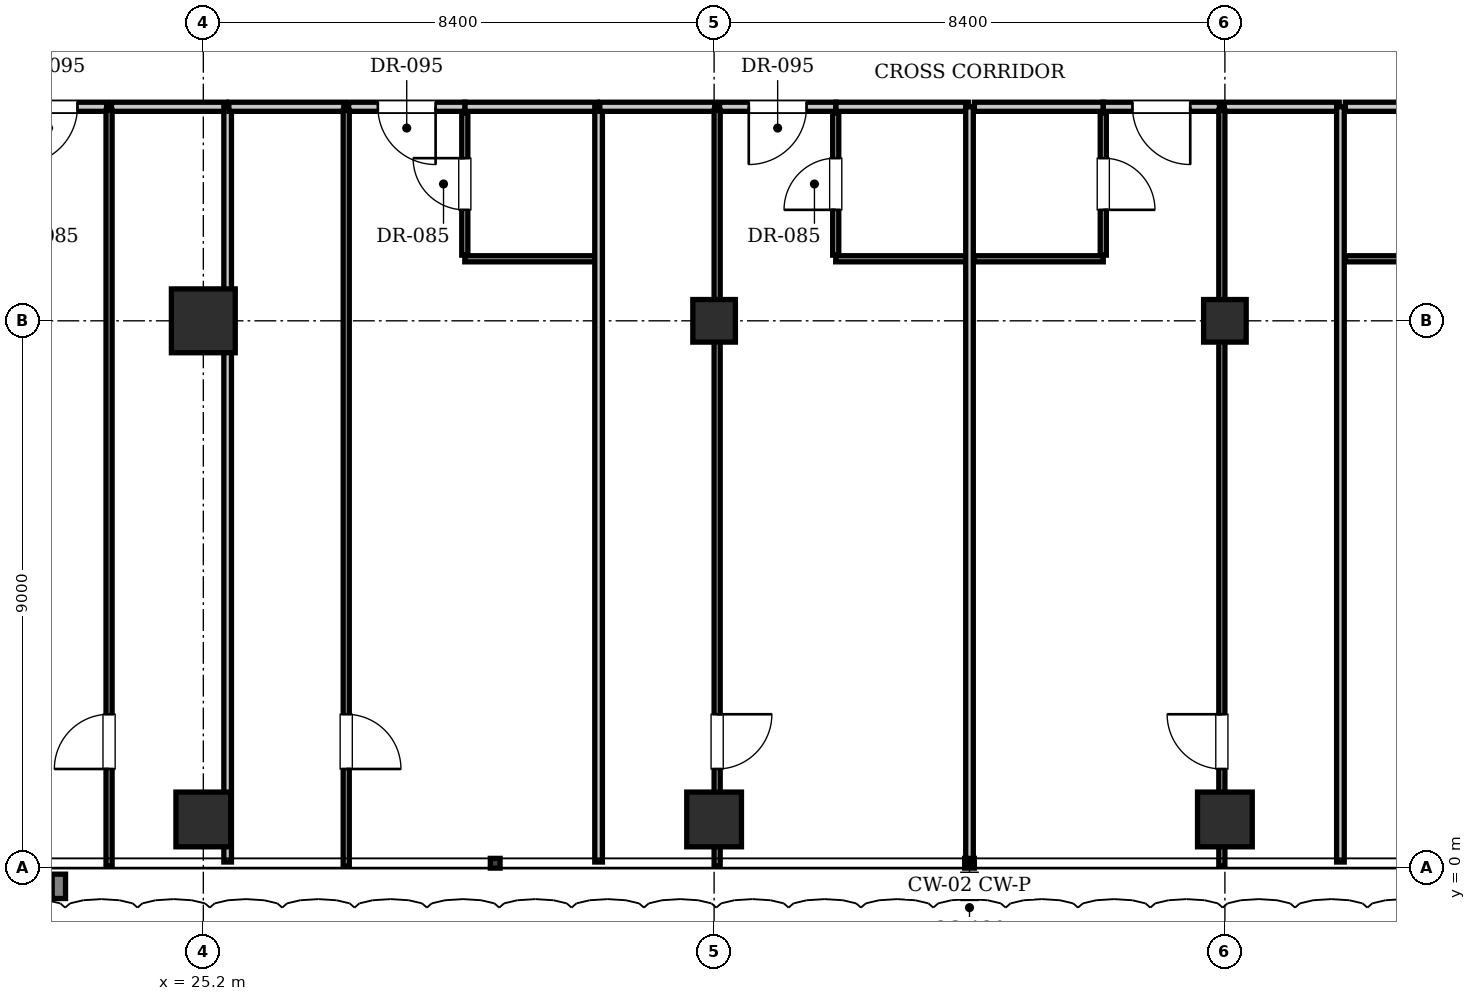
"""IFC4 building model, lengths in metres.
Left out: names, types, materials, properties, quantities, classifications, styles, units other than length and angle.
Written with IfcOpenShell. Run it as: python <this file> out.ifc"""

import sys

from ifc_helpers import new_model, si_unit, direction, frame, frame_2d, origin, origin_2d, place, context, subcontext, project, spatial, rectangle, i_section, extrude, element, fill, save


model = new_model("IFC4")
c1 = context("Model", 3, precision=1e-05, world=origin(), true_north=direction((0.0, 1.0)))
c2 = subcontext(c1, "Body", "Model", "MODEL_VIEW")
j1 = project(units=[si_unit("LENGTHUNIT", "METRE"), si_unit("PLANEANGLEUNIT", "RADIAN")], contexts=[c1])
p1 = place(None, origin())
s1 = spatial("IfcSite", under=j1, at=p1, CompositionType="ELEMENT")
p2 = place(p1, origin())
s2 = spatial("IfcBuilding", under=s1, at=p2, CompositionType="ELEMENT")
p3 = place(p2, frame((0.0, 0.0, 34.65)))
s3 = spatial("IfcBuildingStorey", under=s2, at=p3, CompositionType="ELEMENT", Elevation=34.65)
p4 = place(p3, frame((25.2, 9.0, 0.0), z_axis=(0.0, 0.0, 1.0), x_axis=(1.0, 0.0, 0.0)))
e1 = element("IfcColumn", 1, at=p4, inside=s3, PredefinedType="COLUMN", context=c2, shape_type="SweptSolid", body=[
    extrude(rectangle(XDim=1.05, YDim=1.05, at=origin_2d()), origin(), (0.0, 0.0, 1.0), 3.85),
])
for number, where, z_axis, x_axis in (
    (2, (33.6, 9.0, 0.0), (0.0, 0.0, 1.0), (1.0, 0.0, 0.0)),
    (3, (42.0, 9.0, 0.0), (0.0, 0.0, 1.0), (1.0, 0.0, 0.0)),
):
    element("IfcColumn", number, at=place(p3, frame(where, z_axis=z_axis, x_axis=x_axis)), inside=s3, PredefinedType="COLUMN", context=c2, shape_type="SweptSolid", body=[
        extrude(i_section(OverallWidth=0.7, OverallDepth=0.7, WebThickness=0.028, FlangeThickness=0.044, at=origin_2d()), origin(), (0.0, 0.0, 1.0), 3.85),
    ])
for number, where, z_axis, x_axis in (
    (4, (25.2, 0.8, 0.0), (0.0, 0.0, 1.0), (1.0, 0.0, 0.0)),
    (5, (33.6, 0.8, 0.0), (0.0, 0.0, 1.0), (1.0, 0.0, 0.0)),
    (6, (42.0, 0.8, 0.0), (0.0, 0.0, 1.0), (1.0, 0.0, 0.0)),
):
    element("IfcColumn", number, at=place(p3, frame(where, z_axis=z_axis, x_axis=x_axis)), inside=s3, PredefinedType="COLUMN", context=c2, shape_type="SweptSolid", body=[
        extrude(rectangle(XDim=0.9, YDim=0.9, at=origin_2d()), origin(), (0.0, 0.0, 1.0), 3.85),
    ])
p5 = place(p3, frame((21.7, 12.52, 0.0), z_axis=(0.0, 0.0, 1.0), x_axis=(1.0, 0.0, 0.0)))
e7 = element("IfcWall", 7, at=p5, inside=s3, PredefinedType="PARTITIONING", context=c2, shape_type="SweptSolid", body=[
    extrude(rectangle(XDim=1.91, YDim=0.15, at=frame_2d((0.955, 0.0))), origin(), (0.0, 0.0, 1.0), 3.61),
])
p6 = place(p5, frame((0.48, 0.0, 0.0)))
e8 = element("IfcOpeningElement", 8, at=p6, cuts=e7, PredefinedType="OPENING", context=c2, shape_type="SweptSolid", body=[
    extrude(rectangle(XDim=0.95, YDim=2.15, at=frame_2d((0.475, 1.075))), frame((0.0, 0.085, 0.0), z_axis=(0.0, -1.0, 0.0), x_axis=(1.0, 0.0, 0.0)), (0.0, 0.0, 1.0), 0.17),
])
p7 = place(p3, frame((23.69, 12.52, 0.0), z_axis=(0.0, 0.0, 1.0), x_axis=(1.0, 0.0, 0.0)))
e9 = element("IfcWall", 9, at=p7, inside=s3, PredefinedType="PARTITIONING", context=c2, shape_type="SweptSolid", body=[
    extrude(rectangle(XDim=1.89, YDim=0.15, at=frame_2d((0.945, 0.0))), origin(), (0.0, 0.0, 1.0), 3.61),
])
p8 = place(p3, frame((23.65, 0.03, 0.0), z_axis=(0.0, 0.0, 1.0), x_axis=(0.0, 1.0, 0.0)))
e10 = element("IfcWall", 10, at=p8, inside=s3, PredefinedType="PARTITIONING", context=c2, shape_type="SweptSolid", body=[
    extrude(rectangle(XDim=12.43, YDim=0.1, at=frame_2d((6.215, 0.0))), origin(), (0.0, 0.0, 1.0), 3.61),
])
p9 = place(p8, frame((1.6, 0.0, 0.0)))
e11 = element("IfcOpeningElement", 11, at=p9, cuts=e10, PredefinedType="OPENING", context=c2, shape_type="SweptSolid", body=[
    extrude(rectangle(XDim=0.9, YDim=2.1, at=frame_2d((0.45, 1.05))), frame((0.0, 0.06, 0.0), z_axis=(0.0, -1.0, 0.0), x_axis=(1.0, 0.0, 0.0)), (0.0, 0.0, 1.0), 0.12),
])
p10 = place(p3, frame((25.6, 0.1, 0.0), z_axis=(0.0, 0.0, 1.0), x_axis=(0.0, 1.0, 0.0)))
e12 = element("IfcWall", 12, at=p10, inside=s3, PredefinedType="PARTITIONING", context=c2, shape_type="SweptSolid", body=[
    extrude(rectangle(XDim=12.42, YDim=0.125, at=frame_2d((6.21, 0.0))), origin(), (0.0, 0.0, 1.0), 3.61),
])
p11 = place(p3, frame((29.5, 12.52, 0.0), z_axis=(0.0, 0.0, 1.0), x_axis=(1.0, 0.0, 0.0)))
e13 = element("IfcWall", 13, at=p11, inside=s3, PredefinedType="PARTITIONING", context=c2, shape_type="SweptSolid", body=[
    extrude(rectangle(XDim=2.18, YDim=0.15, at=frame_2d((1.09, 0.0))), origin(), (0.0, 0.0, 1.0), 3.61),
])
p12 = place(p3, frame((29.5, 10.02, 0.0), z_axis=(0.0, 0.0, 1.0), x_axis=(1.0, 0.0, 0.0)))
e14 = element("IfcWall", 14, at=p12, inside=s3, PredefinedType="PARTITIONING", context=c2, shape_type="SweptSolid", body=[
    extrude(rectangle(XDim=2.16, YDim=0.1, at=frame_2d((1.08, 0.0))), origin(), (0.0, 0.0, 1.0), 3.61),
])
p13 = place(p3, frame((29.5, 10.08, 0.0), z_axis=(0.0, 0.0, 1.0), x_axis=(0.0, 1.0, 0.0)))
e15 = element("IfcWall", 15, at=p13, inside=s3, PredefinedType="PARTITIONING", context=c2, shape_type="SweptSolid", body=[
    extrude(rectangle(XDim=2.34, YDim=0.1, at=frame_2d((1.17, 0.0))), origin(), (0.0, 0.0, 1.0), 3.61),
])
p14 = place(p13, frame((0.745, 0.0, 0.0)))
e16 = element("IfcOpeningElement", 16, at=p14, cuts=e15, PredefinedType="OPENING", context=c2, shape_type="SweptSolid", body=[
    extrude(rectangle(XDim=0.85, YDim=2.1, at=frame_2d((0.425, 1.05))), frame((0.0, 0.06, 0.0), z_axis=(0.0, -1.0, 0.0), x_axis=(1.0, 0.0, 0.0)), (0.0, 0.0, 1.0), 0.12),
])
p15 = place(p3, frame((25.62, 12.52, 0.0), z_axis=(0.0, 0.0, 1.0), x_axis=(1.0, 0.0, 0.0)))
e17 = element("IfcWall", 17, at=p15, inside=s3, PredefinedType="PARTITIONING", context=c2, shape_type="SweptSolid", body=[
    extrude(rectangle(XDim=1.89, YDim=0.15, at=frame_2d((0.945, 0.0))), origin(), (0.0, 0.0, 1.0), 3.61),
])
p16 = place(p3, frame((27.59, 12.52, 0.0), z_axis=(0.0, 0.0, 1.0), x_axis=(1.0, 0.0, 0.0)))
e18 = element("IfcWall", 18, at=p16, inside=s3, PredefinedType="PARTITIONING", context=c2, shape_type="SweptSolid", body=[
    extrude(rectangle(XDim=1.91, YDim=0.15, at=frame_2d((0.955, 0.0))), origin(), (0.0, 0.0, 1.0), 3.61),
])
p17 = place(p16, frame((0.48, 0.0, 0.0)))
e19 = element("IfcOpeningElement", 19, at=p17, cuts=e18, PredefinedType="OPENING", context=c2, shape_type="SweptSolid", body=[
    extrude(rectangle(XDim=0.95, YDim=2.15, at=frame_2d((0.475, 1.075))), frame((0.0, 0.085, 0.0), z_axis=(0.0, -1.0, 0.0), x_axis=(1.0, 0.0, 0.0)), (0.0, 0.0, 1.0), 0.17),
])
p18 = place(p3, frame((27.55, 0.03, 0.0), z_axis=(0.0, 0.0, 1.0), x_axis=(0.0, 1.0, 0.0)))
e20 = element("IfcWall", 20, at=p18, inside=s3, PredefinedType="PARTITIONING", context=c2, shape_type="SweptSolid", body=[
    extrude(rectangle(XDim=12.43, YDim=0.1, at=frame_2d((6.215, 0.0))), origin(), (0.0, 0.0, 1.0), 3.61),
])
p19 = place(p18, frame((1.6, 0.0, 0.0)))
e21 = element("IfcOpeningElement", 21, at=p19, cuts=e20, PredefinedType="OPENING", context=c2, shape_type="SweptSolid", body=[
    extrude(rectangle(XDim=0.9, YDim=2.1, at=frame_2d((0.45, 1.05))), frame((0.0, 0.06, 0.0), z_axis=(0.0, -1.0, 0.0), x_axis=(1.0, 0.0, 0.0)), (0.0, 0.0, 1.0), 0.12),
])
p20 = place(p3, frame((31.7, 0.1, 0.0), z_axis=(0.0, 0.0, 1.0), x_axis=(0.0, 1.0, 0.0)))
e22 = element("IfcWall", 22, at=p20, inside=s3, PredefinedType="PARTITIONING", context=c2, shape_type="SweptSolid", body=[
    extrude(rectangle(XDim=12.42, YDim=0.125, at=frame_2d((6.21, 0.0))), origin(), (0.0, 0.0, 1.0), 3.61),
])
p21 = place(p3, frame((35.6, 12.52, 0.0), z_axis=(0.0, 0.0, 1.0), x_axis=(1.0, 0.0, 0.0)))
e23 = element("IfcWall", 23, at=p21, inside=s3, PredefinedType="PARTITIONING", context=c2, shape_type="SweptSolid", body=[
    extrude(rectangle(XDim=2.18, YDim=0.15, at=frame_2d((1.09, 0.0))), origin(), (0.0, 0.0, 1.0), 3.61),
])
p22 = place(p3, frame((35.6, 10.02, 0.0), z_axis=(0.0, 0.0, 1.0), x_axis=(1.0, 0.0, 0.0)))
e24 = element("IfcWall", 24, at=p22, inside=s3, PredefinedType="PARTITIONING", context=c2, shape_type="SweptSolid", body=[
    extrude(rectangle(XDim=2.16, YDim=0.1, at=frame_2d((1.08, 0.0))), origin(), (0.0, 0.0, 1.0), 3.61),
])
p23 = place(p3, frame((35.6, 10.08, 0.0), z_axis=(0.0, 0.0, 1.0), x_axis=(0.0, 1.0, 0.0)))
e25 = element("IfcWall", 25, at=p23, inside=s3, PredefinedType="PARTITIONING", context=c2, shape_type="SweptSolid", body=[
    extrude(rectangle(XDim=2.34, YDim=0.1, at=frame_2d((1.17, 0.0))), origin(), (0.0, 0.0, 1.0), 3.61),
])
p24 = place(p23, frame((0.745, 0.0, 0.0)))
e26 = element("IfcOpeningElement", 26, at=p24, cuts=e25, PredefinedType="OPENING", context=c2, shape_type="SweptSolid", body=[
    extrude(rectangle(XDim=0.85, YDim=2.1, at=frame_2d((0.425, 1.05))), frame((0.0, 0.06, 0.0), z_axis=(0.0, -1.0, 0.0), x_axis=(1.0, 0.0, 0.0)), (0.0, 0.0, 1.0), 0.12),
])
p25 = place(p3, frame((31.72, 12.52, 0.0), z_axis=(0.0, 0.0, 1.0), x_axis=(1.0, 0.0, 0.0)))
e27 = element("IfcWall", 27, at=p25, inside=s3, PredefinedType="PARTITIONING", context=c2, shape_type="SweptSolid", body=[
    extrude(rectangle(XDim=1.89, YDim=0.15, at=frame_2d((0.945, 0.0))), origin(), (0.0, 0.0, 1.0), 3.61),
])
p26 = place(p3, frame((33.69, 12.52, 0.0), z_axis=(0.0, 0.0, 1.0), x_axis=(1.0, 0.0, 0.0)))
e28 = element("IfcWall", 28, at=p26, inside=s3, PredefinedType="PARTITIONING", context=c2, shape_type="SweptSolid", body=[
    extrude(rectangle(XDim=1.91, YDim=0.15, at=frame_2d((0.955, 0.0))), origin(), (0.0, 0.0, 1.0), 3.61),
])
p27 = place(p26, frame((0.48, 0.0, 0.0)))
e29 = element("IfcOpeningElement", 29, at=p27, cuts=e28, PredefinedType="OPENING", context=c2, shape_type="SweptSolid", body=[
    extrude(rectangle(XDim=0.95, YDim=2.15, at=frame_2d((0.475, 1.075))), frame((0.0, 0.085, 0.0), z_axis=(0.0, -1.0, 0.0), x_axis=(1.0, 0.0, 0.0)), (0.0, 0.0, 1.0), 0.17),
])
p28 = place(p3, frame((33.65, 0.03, 0.0), z_axis=(0.0, 0.0, 1.0), x_axis=(0.0, 1.0, 0.0)))
e30 = element("IfcWall", 30, at=p28, inside=s3, PredefinedType="PARTITIONING", context=c2, shape_type="SweptSolid", body=[
    extrude(rectangle(XDim=12.43, YDim=0.1, at=frame_2d((6.215, 0.0))), origin(), (0.0, 0.0, 1.0), 2.988),
])
p29 = place(p28, frame((1.6, 0.0, 0.0)))
e31 = element("IfcOpeningElement", 31, at=p29, cuts=e30, PredefinedType="OPENING", context=c2, shape_type="SweptSolid", body=[
    extrude(rectangle(XDim=0.9, YDim=2.1, at=frame_2d((0.45, 1.05))), frame((0.0, 0.06, 0.0), z_axis=(0.0, -1.0, 0.0), x_axis=(1.0, 0.0, 0.0)), (0.0, 0.0, 1.0), 0.12),
])
p30 = place(p3, frame((37.8, 0.1, 0.0), z_axis=(0.0, 0.0, 1.0), x_axis=(0.0, 1.0, 0.0)))
e32 = element("IfcWall", 32, at=p30, inside=s3, PredefinedType="PARTITIONING", context=c2, shape_type="SweptSolid", body=[
    extrude(rectangle(XDim=12.42, YDim=0.125, at=frame_2d((6.21, 0.0))), origin(), (0.0, 0.0, 1.0), 3.207),
])
p31 = place(p3, frame((37.88, 12.52, 0.0), z_axis=(0.0, 0.0, 1.0), x_axis=(1.0, 0.0, 0.0)))
e33 = element("IfcWall", 33, at=p31, inside=s3, PredefinedType="PARTITIONING", context=c2, shape_type="SweptSolid", body=[
    extrude(rectangle(XDim=2.12, YDim=0.15, at=frame_2d((1.06, 0.0))), origin(), (0.0, 0.0, 1.0), 3.61),
])
p32 = place(p3, frame((37.88, 10.02, 0.0), z_axis=(0.0, 0.0, 1.0), x_axis=(1.0, 0.0, 0.0)))
e34 = element("IfcWall", 34, at=p32, inside=s3, PredefinedType="PARTITIONING", context=c2, shape_type="SweptSolid", body=[
    extrude(rectangle(XDim=2.12, YDim=0.1, at=frame_2d((1.06, 0.0))), origin(), (0.0, 0.0, 1.0), 3.61),
])
p33 = place(p3, frame((40.0, 10.08, 0.0), z_axis=(0.0, 0.0, 1.0), x_axis=(0.0, 1.0, 0.0)))
e35 = element("IfcWall", 35, at=p33, inside=s3, PredefinedType="PARTITIONING", context=c2, shape_type="SweptSolid", body=[
    extrude(rectangle(XDim=2.34, YDim=0.1, at=frame_2d((1.17, 0.0))), origin(), (0.0, 0.0, 1.0), 3.61),
])
p34 = place(p33, frame((0.745, 0.0, 0.0)))
e36 = element("IfcOpeningElement", 36, at=p34, cuts=e35, PredefinedType="OPENING", context=c2, shape_type="SweptSolid", body=[
    extrude(rectangle(XDim=0.85, YDim=2.1, at=frame_2d((0.425, 1.05))), frame((0.0, 0.06, 0.0), z_axis=(0.0, -1.0, 0.0), x_axis=(1.0, 0.0, 0.0)), (0.0, 0.0, 1.0), 0.12),
])
p35 = place(p3, frame((40.0, 12.52, 0.0), z_axis=(0.0, 0.0, 1.0), x_axis=(1.0, 0.0, 0.0)))
e37 = element("IfcWall", 37, at=p35, inside=s3, PredefinedType="PARTITIONING", context=c2, shape_type="SweptSolid", body=[
    extrude(rectangle(XDim=1.91, YDim=0.15, at=frame_2d((0.955, 0.0))), origin(), (0.0, 0.0, 1.0), 3.61),
])
p36 = place(p35, frame((0.48, 0.0, 0.0)))
e38 = element("IfcOpeningElement", 38, at=p36, cuts=e37, PredefinedType="OPENING", context=c2, shape_type="SweptSolid", body=[
    extrude(rectangle(XDim=0.95, YDim=2.15, at=frame_2d((0.475, 1.075))), frame((0.0, 0.085, 0.0), z_axis=(0.0, -1.0, 0.0), x_axis=(1.0, 0.0, 0.0)), (0.0, 0.0, 1.0), 0.17),
])
p37 = place(p3, frame((41.99, 12.52, 0.0), z_axis=(0.0, 0.0, 1.0), x_axis=(1.0, 0.0, 0.0)))
e39 = element("IfcWall", 39, at=p37, inside=s3, PredefinedType="PARTITIONING", context=c2, shape_type="SweptSolid", body=[
    extrude(rectangle(XDim=1.89, YDim=0.15, at=frame_2d((0.945, 0.0))), origin(), (0.0, 0.0, 1.0), 3.61),
])
p38 = place(p3, frame((41.95, 0.03, 0.0), z_axis=(0.0, 0.0, 1.0), x_axis=(0.0, 1.0, 0.0)))
e40 = element("IfcWall", 40, at=p38, inside=s3, PredefinedType="PARTITIONING", context=c2, shape_type="SweptSolid", body=[
    extrude(rectangle(XDim=12.43, YDim=0.1, at=frame_2d((6.215, 0.0))), origin(), (0.0, 0.0, 1.0), 2.988),
])
p39 = place(p38, frame((1.6, 0.0, 0.0)))
e41 = element("IfcOpeningElement", 41, at=p39, cuts=e40, PredefinedType="OPENING", context=c2, shape_type="SweptSolid", body=[
    extrude(rectangle(XDim=0.9, YDim=2.1, at=frame_2d((0.45, 1.05))), frame((0.0, 0.06, 0.0), z_axis=(0.0, -1.0, 0.0), x_axis=(1.0, 0.0, 0.0)), (0.0, 0.0, 1.0), 0.12),
])
p40 = place(p3, frame((43.9, 0.1, 0.0), z_axis=(0.0, 0.0, 1.0), x_axis=(0.0, 1.0, 0.0)))
e42 = element("IfcWall", 42, at=p40, inside=s3, PredefinedType="PARTITIONING", context=c2, shape_type="SweptSolid", body=[
    extrude(rectangle(XDim=12.42, YDim=0.125, at=frame_2d((6.21, 0.0))), origin(), (0.0, 0.0, 1.0), 3.61),
])
p41 = place(p3, frame((43.98, 12.52, 0.0), z_axis=(0.0, 0.0, 1.0), x_axis=(1.0, 0.0, 0.0)))
e43 = element("IfcWall", 43, at=p41, inside=s3, PredefinedType="PARTITIONING", context=c2, shape_type="SweptSolid", body=[
    extrude(rectangle(XDim=2.12, YDim=0.15, at=frame_2d((1.06, 0.0))), origin(), (0.0, 0.0, 1.0), 3.61),
])
p42 = place(p3, frame((43.98, 10.02, 0.0), z_axis=(0.0, 0.0, 1.0), x_axis=(1.0, 0.0, 0.0)))
e44 = element("IfcWall", 44, at=p42, inside=s3, PredefinedType="PARTITIONING", context=c2, shape_type="SweptSolid", body=[
    extrude(rectangle(XDim=2.12, YDim=0.1, at=frame_2d((1.06, 0.0))), origin(), (0.0, 0.0, 1.0), 3.61),
])
p43 = place(p6, frame((0.95, 0.0, 0.0), z_axis=(0.0, 0.0, 1.0), x_axis=(-1.0, 0.0, 0.0)))
e45 = element("IfcDoor", 45, at=p43, inside=s3, OperationType="SINGLE_SWING_RIGHT", PredefinedType="DOOR", context=c2, shape_type="SweptSolid", body=[
    extrude(rectangle(XDim=0.95, YDim=2.15, at=frame_2d((0.475, 1.075))), frame((0.0, 0.025, 0.0), z_axis=(0.0, -1.0, 0.0), x_axis=(1.0, 0.0, 0.0)), (0.0, 0.0, 1.0), 0.05),
])
fill(e8, e45)
p44 = place(p9, origin())
e46 = element("IfcDoor", 46, at=p44, inside=s3, OperationType="SINGLE_SWING_LEFT", PredefinedType="DOOR", context=c2, shape_type="SweptSolid", body=[
    extrude(rectangle(XDim=0.9, YDim=2.1, at=frame_2d((0.45, 1.05))), frame((0.0, 0.025, 0.0), z_axis=(0.0, -1.0, 0.0), x_axis=(1.0, 0.0, 0.0)), (0.0, 0.0, 1.0), 0.05),
])
fill(e11, e46)
p45 = place(p14, origin())
e47 = element("IfcDoor", 47, at=p45, inside=s3, OperationType="SINGLE_SWING_RIGHT", PredefinedType="DOOR", context=c2, shape_type="SweptSolid", body=[
    extrude(rectangle(XDim=0.85, YDim=2.1, at=frame_2d((0.425, 1.05))), frame((0.0, 0.025, 0.0), z_axis=(0.0, -1.0, 0.0), x_axis=(1.0, 0.0, 0.0)), (0.0, 0.0, 1.0), 0.05),
])
fill(e16, e47)
p46 = place(p17, frame((0.95, 0.0, 0.0), z_axis=(0.0, 0.0, 1.0), x_axis=(-1.0, 0.0, 0.0)))
e48 = element("IfcDoor", 48, at=p46, inside=s3, OperationType="SINGLE_SWING_LEFT", PredefinedType="DOOR", context=c2, shape_type="SweptSolid", body=[
    extrude(rectangle(XDim=0.95, YDim=2.15, at=frame_2d((0.475, 1.075))), frame((0.0, 0.025, 0.0), z_axis=(0.0, -1.0, 0.0), x_axis=(1.0, 0.0, 0.0)), (0.0, 0.0, 1.0), 0.05),
])
fill(e19, e48)
p47 = place(p19, frame((0.9, 0.0, 0.0), z_axis=(0.0, 0.0, 1.0), x_axis=(-1.0, 0.0, 0.0)))
e49 = element("IfcDoor", 49, at=p47, inside=s3, OperationType="SINGLE_SWING_RIGHT", PredefinedType="DOOR", context=c2, shape_type="SweptSolid", body=[
    extrude(rectangle(XDim=0.9, YDim=2.1, at=frame_2d((0.45, 1.05))), frame((0.0, 0.025, 0.0), z_axis=(0.0, -1.0, 0.0), x_axis=(1.0, 0.0, 0.0)), (0.0, 0.0, 1.0), 0.05),
])
fill(e21, e49)
p48 = place(p24, origin())
e50 = element("IfcDoor", 50, at=p48, inside=s3, OperationType="SINGLE_SWING_LEFT", PredefinedType="DOOR", context=c2, shape_type="SweptSolid", body=[
    extrude(rectangle(XDim=0.85, YDim=2.1, at=frame_2d((0.425, 1.05))), frame((0.0, 0.025, 0.0), z_axis=(0.0, -1.0, 0.0), x_axis=(1.0, 0.0, 0.0)), (0.0, 0.0, 1.0), 0.05),
])
fill(e26, e50)
p49 = place(p27, frame((0.95, 0.0, 0.0), z_axis=(0.0, 0.0, 1.0), x_axis=(-1.0, 0.0, 0.0)))
e51 = element("IfcDoor", 51, at=p49, inside=s3, OperationType="SINGLE_SWING_RIGHT", PredefinedType="DOOR", context=c2, shape_type="SweptSolid", body=[
    extrude(rectangle(XDim=0.95, YDim=2.15, at=frame_2d((0.475, 1.075))), frame((0.0, 0.025, 0.0), z_axis=(0.0, -1.0, 0.0), x_axis=(1.0, 0.0, 0.0)), (0.0, 0.0, 1.0), 0.05),
])
fill(e29, e51)
p50 = place(p29, frame((0.9, 0.0, 0.0), z_axis=(0.0, 0.0, 1.0), x_axis=(-1.0, 0.0, 0.0)))
e52 = element("IfcDoor", 52, at=p50, inside=s3, OperationType="SINGLE_SWING_LEFT", PredefinedType="DOOR", context=c2, shape_type="SweptSolid", body=[
    extrude(rectangle(XDim=0.9, YDim=2.1, at=frame_2d((0.45, 1.05))), frame((0.0, 0.025, 0.0), z_axis=(0.0, -1.0, 0.0), x_axis=(1.0, 0.0, 0.0)), (0.0, 0.0, 1.0), 0.05),
])
fill(e31, e52)
p51 = place(p34, frame((0.85, 0.0, 0.0), z_axis=(0.0, 0.0, 1.0), x_axis=(-1.0, 0.0, 0.0)))
e53 = element("IfcDoor", 53, at=p51, inside=s3, OperationType="SINGLE_SWING_RIGHT", PredefinedType="DOOR", context=c2, shape_type="SweptSolid", body=[
    extrude(rectangle(XDim=0.85, YDim=2.1, at=frame_2d((0.425, 1.05))), frame((0.0, 0.025, 0.0), z_axis=(0.0, -1.0, 0.0), x_axis=(1.0, 0.0, 0.0)), (0.0, 0.0, 1.0), 0.05),
])
fill(e36, e53)
p52 = place(p36, frame((0.95, 0.0, 0.0), z_axis=(0.0, 0.0, 1.0), x_axis=(-1.0, 0.0, 0.0)))
e54 = element("IfcDoor", 54, at=p52, inside=s3, OperationType="SINGLE_SWING_LEFT", PredefinedType="DOOR", context=c2, shape_type="SweptSolid", body=[
    extrude(rectangle(XDim=0.95, YDim=2.15, at=frame_2d((0.475, 1.075))), frame((0.0, 0.025, 0.0), z_axis=(0.0, -1.0, 0.0), x_axis=(1.0, 0.0, 0.0)), (0.0, 0.0, 1.0), 0.05),
])
fill(e38, e54)
p53 = place(p39, origin())
e55 = element("IfcDoor", 55, at=p53, inside=s3, OperationType="SINGLE_SWING_RIGHT", PredefinedType="DOOR", context=c2, shape_type="SweptSolid", body=[
    extrude(rectangle(XDim=0.9, YDim=2.1, at=frame_2d((0.45, 1.05))), frame((0.0, 0.025, 0.0), z_axis=(0.0, -1.0, 0.0), x_axis=(1.0, 0.0, 0.0)), (0.0, 0.0, 1.0), 0.05),
])
fill(e41, e55)
save(model, sys.argv[1])
